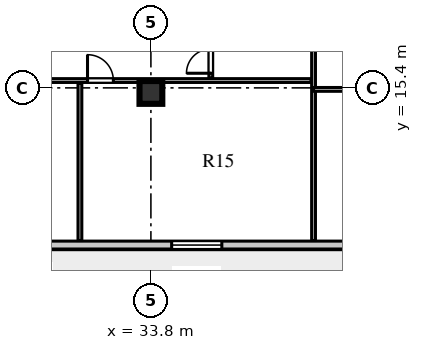
"""IFC4 building model, lengths in metres.
Left out: names, types, materials, properties, quantities, classifications, styles, units other than length and angle.
Written with IfcOpenShell. Run it as: python <this file> out.ifc"""

import sys

from ifc_helpers import new_model, si_unit, direction, frame, frame_2d, origin, origin_2d, place, context, subcontext, project, spatial, rectangle, extrude, element, fill, save


model = new_model("IFC4")
c1 = context("Model", 3, precision=1e-05, world=origin(), true_north=direction((0.0, 1.0)))
c2 = subcontext(c1, "Body", "Model", "MODEL_VIEW")
j1 = project(units=[si_unit("LENGTHUNIT", "METRE"), si_unit("PLANEANGLEUNIT", "RADIAN")], contexts=[c1])
p1 = place(None, origin())
s1 = spatial("IfcSite", under=j1, at=p1, CompositionType="ELEMENT")
p2 = place(p1, origin())
s2 = spatial("IfcBuilding", under=s1, at=p2, CompositionType="ELEMENT")
p3 = place(p2, frame((0.0, 0.0, 272.6)))
s3 = spatial("IfcBuildingStorey", under=s2, at=p3, CompositionType="ELEMENT", Elevation=272.6)
p4 = place(p3, frame((33.8, 15.25, 0.0), z_axis=(0.0, 0.0, 1.0), x_axis=(1.0, 0.0, 0.0)))
e1 = element("IfcColumn", 1, at=p4, inside=s3, PredefinedType="COLUMN", context=c2, shape_type="SweptSolid", body=[
    extrude(rectangle(XDim=0.75, YDim=0.75, at=origin_2d()), origin(), (0.0, 0.0, 1.0), 3.66),
])
p5 = place(p3, frame((13.45, 10.23, 0.0), z_axis=(0.0, 0.0, 1.0), x_axis=(1.0, 0.0, 0.0)))
e2 = element("IfcWall", 2, at=p5, inside=s3, PredefinedType="SOLIDWALL", context=c2, shape_type="SweptSolid", body=[
    extrude(rectangle(XDim=31.7, YDim=0.26, at=frame_2d((15.85, 0.0))), origin(), (0.0, 0.0, 1.0), 3.66),
])
p6 = place(p5, frame((0.95, 0.0, 0.0)))
e3 = element("IfcOpeningElement", 3, at=p6, cuts=e2, PredefinedType="OPENING", context=c2, shape_type="SweptSolid", body=[
    extrude(rectangle(XDim=1.0, YDim=2.05, at=frame_2d((0.5, 1.025))), frame((0.0, 0.14, 0.0), z_axis=(0.0, -1.0, 0.0), x_axis=(1.0, 0.0, 0.0)), (0.0, 0.0, 1.0), 0.28),
])
p7 = place(p5, frame((5.785, 0.0, 0.8)))
e4 = element("IfcOpeningElement", 4, at=p7, cuts=e2, PredefinedType="OPENING", context=c2, shape_type="SweptSolid", body=[
    extrude(rectangle(XDim=2.1, YDim=1.95, at=frame_2d((1.05, 0.975))), frame((0.0, 0.14, 0.0), z_axis=(0.0, -1.0, 0.0), x_axis=(1.0, 0.0, 0.0)), (0.0, 0.0, 1.0), 0.28),
])
p8 = place(p5, frame((15.148, 0.0, 0.8)))
e5 = element("IfcOpeningElement", 5, at=p8, cuts=e2, PredefinedType="OPENING", context=c2, shape_type="SweptSolid", body=[
    extrude(rectangle(XDim=1.35, YDim=1.9, at=frame_2d((0.675, 0.95))), frame((0.0, 0.14, 0.0), z_axis=(0.0, -1.0, 0.0), x_axis=(1.0, 0.0, 0.0)), (0.0, 0.0, 1.0), 0.28),
])
p9 = place(p5, frame((21.033, 0.0, 0.8)))
e6 = element("IfcOpeningElement", 6, at=p9, cuts=e2, PredefinedType="OPENING", context=c2, shape_type="SweptSolid", body=[
    extrude(rectangle(XDim=1.65, YDim=1.95, at=frame_2d((0.825, 0.975))), frame((0.0, 0.14, 0.0), z_axis=(0.0, -1.0, 0.0), x_axis=(1.0, 0.0, 0.0)), (0.0, 0.0, 1.0), 0.28),
])
p10 = place(p5, frame((27.67, 0.0, 0.8)))
e7 = element("IfcOpeningElement", 7, at=p10, cuts=e2, PredefinedType="OPENING", context=c2, shape_type="SweptSolid", body=[
    extrude(rectangle(XDim=1.95, YDim=2.0, at=frame_2d((0.975, 1.0))), frame((0.0, 0.14, 0.0), z_axis=(0.0, -1.0, 0.0), x_axis=(1.0, 0.0, 0.0)), (0.0, 0.0, 1.0), 0.28),
])
p11 = place(p3, frame((39.15, 10.38, 0.0), z_axis=(0.0, 0.0, 1.0), x_axis=(0.0, 1.0, 0.0)))
e8 = element("IfcWall", 8, at=p11, inside=s3, PredefinedType="PLUMBINGWALL", context=c2, shape_type="SweptSolid", body=[
    extrude(rectangle(XDim=11.04, YDim=0.125, at=frame_2d((5.52, 0.0))), origin(), (0.0, 0.0, 1.0), 3.66),
])
p12 = place(p3, frame((27.24, 15.641, 0.0), z_axis=(0.0, 0.0, 1.0), x_axis=(1.0, 0.0, 0.0)))
e9 = element("IfcWall", 9, at=p12, inside=s3, PredefinedType="PLUMBINGWALL", context=c2, shape_type="SweptSolid", body=[
    extrude(rectangle(XDim=11.83, YDim=0.125, at=frame_2d((5.915, 0.0))), origin(), (0.0, 0.0, 1.0), 3.66),
])
p13 = place(p12, frame((0.3, 0.0, 0.0)))
e10 = element("IfcOpeningElement", 10, at=p13, cuts=e9, PredefinedType="OPENING", context=c2, shape_type="SweptSolid", body=[
    extrude(rectangle(XDim=0.85, YDim=2.08, at=frame_2d((0.425, 1.04))), frame((0.0, 0.073, 0.0), z_axis=(0.0, -1.0, 0.0), x_axis=(1.0, 0.0, 0.0)), (0.0, 0.0, 1.0), 0.145),
])
p14 = place(p12, frame((4.475, 0.0, 0.0)))
e11 = element("IfcOpeningElement", 11, at=p14, cuts=e9, PredefinedType="OPENING", context=c2, shape_type="SweptSolid", body=[
    extrude(rectangle(XDim=0.85, YDim=2.08, at=frame_2d((0.425, 1.04))), frame((0.0, 0.073, 0.0), z_axis=(0.0, -1.0, 0.0), x_axis=(1.0, 0.0, 0.0)), (0.0, 0.0, 1.0), 0.145),
])
p15 = place(p3, frame((35.77, 15.721, 0.0), z_axis=(0.0, 0.0, 1.0), x_axis=(0.0, 1.0, 0.0)))
e12 = element("IfcWall", 12, at=p15, inside=s3, PredefinedType="PLUMBINGWALL", context=c2, shape_type="SweptSolid", body=[
    extrude(rectangle(XDim=5.619, YDim=0.125, at=frame_2d((2.81, 0.0))), origin(), (0.0, 0.0, 1.0), 3.66),
])
p16 = place(p15, frame((0.16, 0.0, 0.0)))
e13 = element("IfcOpeningElement", 13, at=p16, cuts=e12, PredefinedType="OPENING", context=c2, shape_type="SweptSolid", body=[
    extrude(rectangle(XDim=0.8, YDim=2.05, at=frame_2d((0.4, 1.025))), frame((0.0, 0.073, 0.0), z_axis=(0.0, -1.0, 0.0), x_axis=(1.0, 0.0, 0.0)), (0.0, 0.0, 1.0), 0.145),
])
p17 = place(p15, frame((2.977, 0.0, 0.0)))
e14 = element("IfcOpeningElement", 14, at=p17, cuts=e12, PredefinedType="OPENING", context=c2, shape_type="SweptSolid", body=[
    extrude(rectangle(XDim=0.85, YDim=2.08, at=frame_2d((0.425, 1.04))), frame((0.0, 0.073, 0.0), z_axis=(0.0, -1.0, 0.0), x_axis=(1.0, 0.0, 0.0)), (0.0, 0.0, 1.0), 0.145),
])
p18 = place(p3, frame((31.465, 10.38, 0.0), z_axis=(0.0, 0.0, 1.0), x_axis=(0.0, 1.0, 0.0)))
e15 = element("IfcWall", 15, at=p18, inside=s3, PredefinedType="PLUMBINGWALL", context=c2, shape_type="SweptSolid", body=[
    extrude(rectangle(XDim=5.181, YDim=0.125, at=frame_2d((2.591, 0.0))), origin(), (0.0, 0.0, 1.0), 3.66),
])
p19 = place(p3, frame((39.15, 15.35, 0.0), z_axis=(0.0, 0.0, 1.0), x_axis=(1.0, 0.0, 0.0)))
e16 = element("IfcWall", 16, at=p19, inside=s3, PredefinedType="PLUMBINGWALL", context=c2, shape_type="SweptSolid", body=[
    extrude(rectangle(XDim=8.77, YDim=0.125, at=frame_2d((4.385, 0.0))), origin(), (0.0, 0.0, 1.0), 3.06),
])
p20 = place(p9, origin())
e17 = element("IfcWindow", 17, at=p20, inside=s3, PartitioningType="SINGLE_PANEL", PredefinedType="WINDOW", context=c2, shape_type="SweptSolid", body=[
    extrude(rectangle(XDim=1.65, YDim=1.95, at=frame_2d((0.825, 0.975))), frame((0.0, 0.03, 0.0), z_axis=(0.0, -1.0, 0.0), x_axis=(1.0, 0.0, 0.0)), (0.0, 0.0, 1.0), 0.06),
])
fill(e6, e17)
p21 = place(p16, origin())
e18 = element("IfcDoor", 18, at=p21, inside=s3, OperationType="SINGLE_SWING_LEFT", PredefinedType="DOOR", context=c2, shape_type="SweptSolid", body=[
    extrude(rectangle(XDim=0.8, YDim=2.05, at=frame_2d((0.4, 1.025))), frame((0.0, 0.025, 0.0), z_axis=(0.0, -1.0, 0.0), x_axis=(1.0, 0.0, 0.0)), (0.0, 0.0, 1.0), 0.05),
])
fill(e13, e18)
p22 = place(p14, frame((0.85, 0.0, 0.0), z_axis=(0.0, 0.0, 1.0), x_axis=(-1.0, 0.0, 0.0)))
e19 = element("IfcDoor", 19, at=p22, inside=s3, OperationType="SINGLE_SWING_RIGHT", PredefinedType="DOOR", context=c2, shape_type="SweptSolid", body=[
    extrude(rectangle(XDim=0.85, YDim=2.08, at=frame_2d((0.425, 1.04))), frame((0.0, 0.025, 0.0), z_axis=(0.0, -1.0, 0.0), x_axis=(1.0, 0.0, 0.0)), (0.0, 0.0, 1.0), 0.05),
])
fill(e11, e19)
save(model, sys.argv[1])
